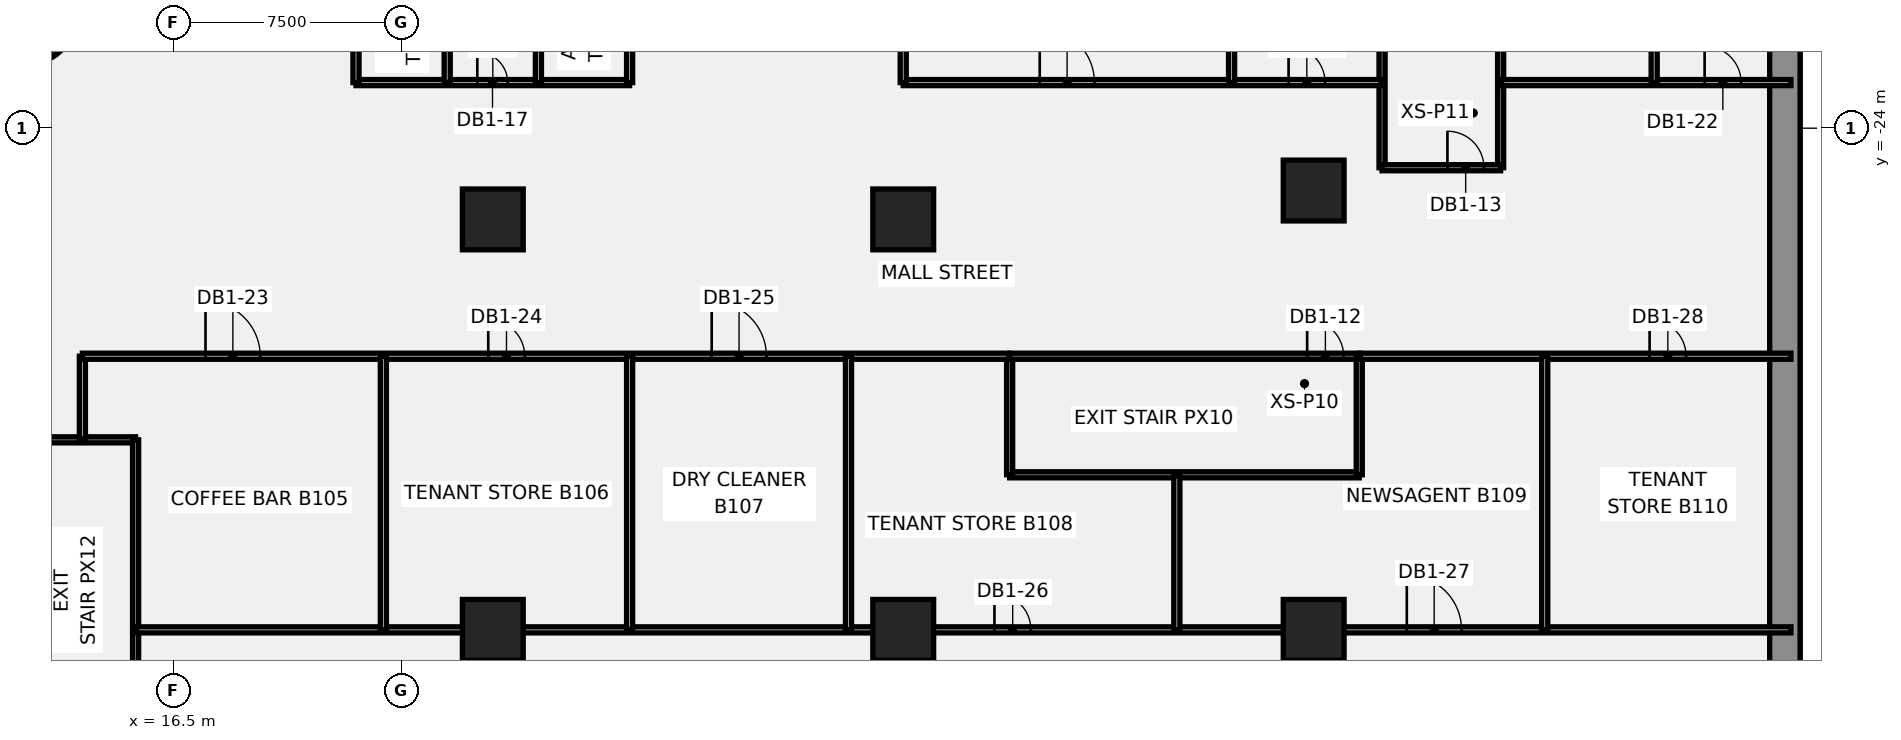
"""IFC4 building model, lengths in metres.
Left out: names, types, materials, properties, quantities, classifications, styles, units other than length and angle.
Written with IfcOpenShell. Run it as: python <this file> out.ifc"""

import sys

from ifc_helpers import new_model, si_unit, direction, frame, frame_2d, origin, origin_2d, place, context, subcontext, project, spatial, rectangle, circle, extrude, element, fill, save


model = new_model("IFC4")
c1 = context("Model", 3, precision=1e-05, world=origin(), true_north=direction((0.0, 1.0)))
c2 = subcontext(c1, "Body", "Model", "MODEL_VIEW")
j1 = project(units=[si_unit("LENGTHUNIT", "METRE"), si_unit("PLANEANGLEUNIT", "RADIAN")], contexts=[c1])
p1 = place(None, origin())
s1 = spatial("IfcSite", under=j1, at=p1, CompositionType="ELEMENT")
p2 = place(p1, origin())
s2 = spatial("IfcBuilding", under=s1, at=p2, CompositionType="ELEMENT")
p3 = place(p2, frame((0.0, 0.0, -7.0)))
s3 = spatial("IfcBuildingStorey", under=s2, at=p3, CompositionType="ELEMENT", Elevation=-7.0)
p4 = place(p3, frame((69.5, 53.931, -0.45), z_axis=(0.0, 0.0, 1.0), x_axis=(0.0, -1.0, 0.0)))
e1 = element("IfcWall", 1, at=p4, inside=s3, PredefinedType="SOLIDWALL", context=c2, shape_type="SweptSolid", body=[
    extrude(rectangle(XDim=107.863, YDim=1.0, at=frame_2d((53.931, 0.0))), origin(), (0.0, 0.0, 1.0), 6.9),
])
p5 = place(p3, frame((11.86, -20.543, -0.45), z_axis=(0.0, 0.0, 1.0), x_axis=(1.0, 0.0, 0.0)))
e2 = element("IfcColumn", 2, at=p5, inside=s3, PredefinedType="COLUMN", context=c2, shape_type="SweptSolid", body=[
    extrude(circle(Radius=1.3, at=origin_2d()), origin(), (0.0, 0.0, 1.0), 6.9),
])
for number, where, z_axis, x_axis in (
    (3, (27.0, -40.5, -0.45), (0.0, 0.0, 1.0), (1.0, 0.0, 0.0)),
    (4, (27.0, -27.0, -0.45), (0.0, 0.0, 1.0), (1.0, 0.0, 0.0)),
    (5, (40.5, -40.5, -0.45), (0.0, 0.0, 1.0), (1.0, 0.0, 0.0)),
    (6, (40.5, -27.0, -0.45), (0.0, 0.0, 1.0), (1.0, 0.0, 0.0)),
    (7, (54.0, -40.5, -0.45), (0.0, 0.0, 1.0), (1.0, 0.0, 0.0)),
    (8, (54.0, -26.05, -0.45), (0.0, 0.0, 1.0), (1.0, 0.0, 0.0)),
):
    element("IfcColumn", number, at=place(p3, frame(where, z_axis=z_axis, x_axis=x_axis)), inside=s3, PredefinedType="COLUMN", context=c2, shape_type="SweptSolid", body=[
        extrude(rectangle(XDim=2.0, YDim=2.0, at=origin_2d()), origin(), (0.0, 0.0, 1.0), 6.9),
    ])
p6 = place(p3, frame((11.35, -34.25, 0.0), z_axis=(0.0, 0.0, 1.0), x_axis=(1.0, 0.0, 0.0)))
e9 = element("IfcWall", 9, at=p6, inside=s3, PredefinedType="PARTITIONING", context=c2, shape_type="SweptSolid", body=[
    extrude(rectangle(XDim=3.9, YDim=0.2, at=frame_2d((1.95, 0.0))), origin(), (0.0, 0.0, 1.0), 6.45),
])
p7 = place(p3, frame((15.25, -45.75, 0.0), z_axis=(0.0, 0.0, 1.0), x_axis=(0.0, 1.0, 0.0)))
e10 = element("IfcWall", 10, at=p7, inside=s3, PredefinedType="PARTITIONING", context=c2, shape_type="SweptSolid", body=[
    extrude(rectangle(XDim=11.5, YDim=0.2, at=frame_2d((5.75, 0.0))), origin(), (0.0, 0.0, 1.0), 6.45),
])
p8 = place(p7, frame((0.326, 0.0, 0.0)))
e11 = element("IfcOpeningElement", 11, at=p8, cuts=e10, PredefinedType="OPENING", context=c2, shape_type="SweptSolid", body=[
    extrude(rectangle(XDim=1.2, YDim=2.1, at=frame_2d((0.6, 1.05))), frame((0.0, 0.11, 0.0), z_axis=(0.0, -1.0, 0.0), x_axis=(1.0, 0.0, 0.0)), (0.0, 0.0, 1.0), 0.22),
])
p9 = place(p3, frame((44.0, -35.4, 0.0), z_axis=(0.0, 0.0, 1.0), x_axis=(1.0, 0.0, 0.0)))
e12 = element("IfcWall", 12, at=p9, inside=s3, PredefinedType="PARTITIONING", context=c2, shape_type="SweptSolid", body=[
    extrude(rectangle(XDim=11.5, YDim=0.2, at=frame_2d((5.75, 0.0))), origin(), (0.0, 0.0, 1.0), 6.45),
])
p10 = place(p3, frame((44.0, -35.4, 0.0), z_axis=(0.0, 0.0, 1.0), x_axis=(0.0, 1.0, 0.0)))
e13 = element("IfcWall", 13, at=p10, inside=s3, PredefinedType="PARTITIONING", context=c2, shape_type="SweptSolid", body=[
    extrude(rectangle(XDim=3.9, YDim=0.2, at=frame_2d((1.95, 0.0))), origin(), (0.0, 0.0, 1.0), 6.45),
])
p11 = place(p3, frame((44.0, -31.5, 0.0), z_axis=(0.0, 0.0, 1.0), x_axis=(1.0, 0.0, 0.0)))
e14 = element("IfcWall", 14, at=p11, inside=s3, PredefinedType="PARTITIONING", context=c2, shape_type="SweptSolid", body=[
    extrude(rectangle(XDim=11.5, YDim=0.2, at=frame_2d((5.75, 0.0))), origin(), (0.0, 0.0, 1.0), 6.45),
])
p12 = place(p11, frame((9.786, 0.0, 0.0)))
e15 = element("IfcOpeningElement", 15, at=p12, cuts=e14, PredefinedType="OPENING", context=c2, shape_type="SweptSolid", body=[
    extrude(rectangle(XDim=1.2, YDim=2.1, at=frame_2d((0.6, 1.05))), frame((0.0, 0.11, 0.0), z_axis=(0.0, -1.0, 0.0), x_axis=(1.0, 0.0, 0.0)), (0.0, 0.0, 1.0), 0.22),
])
p13 = place(p3, frame((55.5, -35.4, 0.0), z_axis=(0.0, 0.0, 1.0), x_axis=(0.0, 1.0, 0.0)))
e16 = element("IfcWall", 16, at=p13, inside=s3, PredefinedType="PARTITIONING", context=c2, shape_type="SweptSolid", body=[
    extrude(rectangle(XDim=3.9, YDim=0.2, at=frame_2d((1.95, 0.0))), origin(), (0.0, 0.0, 1.0), 6.45),
])
for number, where, z_axis, x_axis in (
    (17, (56.25, -25.3, 0.0), (0.0, 0.0, 1.0), (0.0, 1.0, 0.0)),
    (18, (60.15, -25.3, 0.0), (0.0, 0.0, 1.0), (0.0, 1.0, 0.0)),
):
    element("IfcWall", number, at=place(p3, frame(where, z_axis=z_axis, x_axis=x_axis)), inside=s3, PredefinedType="PARTITIONING", context=c2, shape_type="SweptSolid", body=[
        extrude(rectangle(XDim=11.5, YDim=0.2, at=frame_2d((5.75, 0.0))), origin(), (0.0, 0.0, 1.0), 6.45),
    ])
p14 = place(p3, frame((56.25, -25.3, 0.0), z_axis=(0.0, 0.0, 1.0), x_axis=(1.0, 0.0, 0.0)))
e19 = element("IfcWall", 19, at=p14, inside=s3, PredefinedType="PARTITIONING", context=c2, shape_type="SweptSolid", body=[
    extrude(rectangle(XDim=3.9, YDim=0.2, at=frame_2d((1.95, 0.0))), origin(), (0.0, 0.0, 1.0), 6.45),
])
p15 = place(p14, frame((2.15, 0.0, 0.0)))
e20 = element("IfcOpeningElement", 20, at=p15, cuts=e19, PredefinedType="OPENING", context=c2, shape_type="SweptSolid", body=[
    extrude(rectangle(XDim=1.2, YDim=2.1, at=frame_2d((0.6, 1.05))), frame((0.0, 0.11, 0.0), z_axis=(0.0, -1.0, 0.0), x_axis=(1.0, 0.0, 0.0)), (0.0, 0.0, 1.0), 0.22),
])
p16 = place(p3, frame((13.5, -34.22, 0.0), z_axis=(0.0, 0.0, 1.0), x_axis=(0.0, 1.0, 0.0)))
e21 = element("IfcWall", 21, at=p16, inside=s3, PredefinedType="PARTITIONING", context=c2, shape_type="SweptSolid", body=[
    extrude(rectangle(XDim=2.72, YDim=0.2, at=frame_2d((1.36, 0.0))), origin(), (0.0, 0.0, 1.0), 6.45),
])
p17 = place(p3, frame((13.5, -31.5, 0.0), z_axis=(0.0, 0.0, 1.0), x_axis=(1.0, 0.0, 0.0)))
e22 = element("IfcWall", 22, at=p17, inside=s3, PredefinedType="PARTITIONING", context=c2, shape_type="SweptSolid", body=[
    extrude(rectangle(XDim=30.47, YDim=0.2, at=frame_2d((15.235, 0.0))), origin(), (0.0, 0.0, 1.0), 6.45),
])
p18 = place(p17, frame((4.05, 0.0, 0.0)))
e23 = element("IfcOpeningElement", 23, at=p18, cuts=e22, PredefinedType="OPENING", context=c2, shape_type="SweptSolid", body=[
    extrude(rectangle(XDim=1.8, YDim=2.1, at=frame_2d((0.9, 1.05))), frame((0.0, 0.11, 0.0), z_axis=(0.0, -1.0, 0.0), x_axis=(1.0, 0.0, 0.0)), (0.0, 0.0, 1.0), 0.22),
])
p19 = place(p17, frame((13.35, 0.0, 0.0)))
e24 = element("IfcOpeningElement", 24, at=p19, cuts=e22, PredefinedType="OPENING", context=c2, shape_type="SweptSolid", body=[
    extrude(rectangle(XDim=1.2, YDim=2.1, at=frame_2d((0.6, 1.05))), frame((0.0, 0.11, 0.0), z_axis=(0.0, -1.0, 0.0), x_axis=(1.0, 0.0, 0.0)), (0.0, 0.0, 1.0), 0.22),
])
p20 = place(p17, frame((20.7, 0.0, 0.0)))
e25 = element("IfcOpeningElement", 25, at=p20, cuts=e22, PredefinedType="OPENING", context=c2, shape_type="SweptSolid", body=[
    extrude(rectangle(XDim=1.8, YDim=2.1, at=frame_2d((0.9, 1.05))), frame((0.0, 0.11, 0.0), z_axis=(0.0, -1.0, 0.0), x_axis=(1.0, 0.0, 0.0)), (0.0, 0.0, 1.0), 0.22),
])
p21 = place(p3, frame((15.28, -40.5, 0.0), z_axis=(0.0, 0.0, 1.0), x_axis=(1.0, 0.0, 0.0)))
e26 = element("IfcWall", 26, at=p21, inside=s3, PredefinedType="PARTITIONING", context=c2, shape_type="SweptSolid", body=[
    extrude(rectangle(XDim=54.419, YDim=0.2, at=frame_2d((27.209, 0.0))), origin(), (0.0, 0.0, 1.0), 6.45),
])
p22 = place(p21, frame((28.22, 0.0, 0.0)))
e27 = element("IfcOpeningElement", 27, at=p22, cuts=e26, PredefinedType="OPENING", context=c2, shape_type="SweptSolid", body=[
    extrude(rectangle(XDim=1.2, YDim=2.1, at=frame_2d((0.6, 1.05))), frame((0.0, 0.11, 0.0), z_axis=(0.0, -1.0, 0.0), x_axis=(1.0, 0.0, 0.0)), (0.0, 0.0, 1.0), 0.22),
])
p23 = place(p21, frame((41.784, 0.0, 0.0)))
e28 = element("IfcOpeningElement", 28, at=p23, cuts=e26, PredefinedType="OPENING", context=c2, shape_type="SweptSolid", body=[
    extrude(rectangle(XDim=1.8, YDim=2.1, at=frame_2d((0.9, 1.05))), frame((0.0, 0.11, 0.0), z_axis=(0.0, -1.0, 0.0), x_axis=(1.0, 0.0, 0.0)), (0.0, 0.0, 1.0), 0.22),
])
p24 = place(p3, frame((23.4, -40.5, 0.0), z_axis=(0.0, 0.0, 1.0), x_axis=(0.0, 1.0, 0.0)))
e29 = element("IfcWall", 29, at=p24, inside=s3, PredefinedType="PARTITIONING", context=c2, shape_type="SweptSolid", body=[
    extrude(rectangle(XDim=9.0, YDim=0.2, at=frame_2d((4.5, 0.0))), origin(), (0.0, 0.0, 1.0), 6.45),
])
p25 = place(p3, frame((22.5, -22.5, 0.0), z_axis=(0.0, 0.0, 1.0), x_axis=(1.0, 0.0, 0.0)))
e30 = element("IfcWall", 30, at=p25, inside=s3, PredefinedType="PARTITIONING", context=c2, shape_type="SweptSolid", body=[
    extrude(rectangle(XDim=9.0, YDim=0.2, at=frame_2d((4.5, 0.0))), origin(), (0.0, 0.0, 1.0), 6.45),
])
p26 = place(p25, frame((3.99, 0.0, 0.0)))
e31 = element("IfcOpeningElement", 31, at=p26, cuts=e30, PredefinedType="OPENING", context=c2, shape_type="SweptSolid", body=[
    extrude(rectangle(XDim=1.0, YDim=2.1, at=frame_2d((0.5, 1.05))), frame((0.0, 0.11, 0.0), z_axis=(0.0, -1.0, 0.0), x_axis=(1.0, 0.0, 0.0)), (0.0, 0.0, 1.0), 0.22),
])
p27 = place(p3, frame((25.5, -22.5, 0.0), z_axis=(0.0, 0.0, 1.0), x_axis=(0.0, 1.0, 0.0)))
e32 = element("IfcWall", 32, at=p27, inside=s3, PredefinedType="PARTITIONING", context=c2, shape_type="SweptSolid", body=[
    extrude(rectangle(XDim=9.0, YDim=0.2, at=frame_2d((4.5, 0.0))), origin(), (0.0, 0.0, 1.0), 6.45),
])
p28 = place(p3, frame((22.5, -22.5, 0.0), z_axis=(0.0, 0.0, 1.0), x_axis=(0.0, 1.0, 0.0)))
e33 = element("IfcWall", 33, at=p28, inside=s3, PredefinedType="PARTITIONING", context=c2, shape_type="SweptSolid", body=[
    extrude(rectangle(XDim=9.0, YDim=0.2, at=frame_2d((4.5, 0.0))), origin(), (0.0, 0.0, 1.0), 6.45),
])
p29 = place(p28, frame((5.5, 0.0, 0.0)))
e34 = element("IfcOpeningElement", 34, at=p29, cuts=e33, PredefinedType="OPENING", context=c2, shape_type="SweptSolid", body=[
    extrude(rectangle(XDim=1.0, YDim=2.1, at=frame_2d((0.5, 1.05))), frame((0.0, 0.11, 0.0), z_axis=(0.0, -1.0, 0.0), x_axis=(1.0, 0.0, 0.0)), (0.0, 0.0, 1.0), 0.22),
])
p30 = place(p3, frame((31.5, -22.5, 0.0), z_axis=(0.0, 0.0, 1.0), x_axis=(0.0, 1.0, 0.0)))
e35 = element("IfcWall", 35, at=p30, inside=s3, PredefinedType="PARTITIONING", context=c2, shape_type="SweptSolid", body=[
    extrude(rectangle(XDim=9.0, YDim=0.2, at=frame_2d((4.5, 0.0))), origin(), (0.0, 0.0, 1.0), 6.45),
])
p31 = place(p30, frame((5.46, 0.0, 0.0)))
e36 = element("IfcOpeningElement", 36, at=p31, cuts=e35, PredefinedType="OPENING", context=c2, shape_type="SweptSolid", body=[
    extrude(rectangle(XDim=1.1, YDim=2.1, at=frame_2d((0.55, 1.05))), frame((0.0, 0.11, 0.0), z_axis=(0.0, -1.0, 0.0), x_axis=(1.0, 0.0, 0.0)), (0.0, 0.0, 1.0), 0.22),
])
for number, where, z_axis, x_axis in (
    (37, (28.5, -22.5, 0.0), (0.0, 0.0, 1.0), (0.0, 1.0, 0.0)),
    (38, (31.5, -40.5, 0.0), (0.0, 0.0, 1.0), (0.0, 1.0, 0.0)),
    (39, (38.7, -40.5, 0.0), (0.0, 0.0, 1.0), (0.0, 1.0, 0.0)),
):
    element("IfcWall", number, at=place(p3, frame(where, z_axis=z_axis, x_axis=x_axis)), inside=s3, PredefinedType="PARTITIONING", context=c2, shape_type="SweptSolid", body=[
        extrude(rectangle(XDim=9.0, YDim=0.2, at=frame_2d((4.5, 0.0))), origin(), (0.0, 0.0, 1.0), 6.45),
    ])
p32 = place(p3, frame((49.5, -40.5, 0.0), z_axis=(0.0, 0.0, 1.0), x_axis=(0.0, 1.0, 0.0)))
e40 = element("IfcWall", 40, at=p32, inside=s3, PredefinedType="PARTITIONING", context=c2, shape_type="SweptSolid", body=[
    extrude(rectangle(XDim=5.07, YDim=0.2, at=frame_2d((2.535, 0.0))), origin(), (0.0, 0.0, 1.0), 6.45),
])
p33 = place(p3, frame((40.5, -22.5, 0.0), z_axis=(0.0, 0.0, 1.0), x_axis=(1.0, 0.0, 0.0)))
e41 = element("IfcWall", 41, at=p33, inside=s3, PredefinedType="PARTITIONING", context=c2, shape_type="SweptSolid", body=[
    extrude(rectangle(XDim=15.72, YDim=0.2, at=frame_2d((7.86, 0.0))), origin(), (0.0, 0.0, 1.0), 6.45),
])
p34 = place(p33, frame((4.49, 0.0, 0.0)))
e42 = element("IfcOpeningElement", 42, at=p34, cuts=e41, PredefinedType="OPENING", context=c2, shape_type="SweptSolid", body=[
    extrude(rectangle(XDim=1.8, YDim=2.1, at=frame_2d((0.9, 1.05))), frame((0.0, 0.11, 0.0), z_axis=(0.0, -1.0, 0.0), x_axis=(1.0, 0.0, 0.0)), (0.0, 0.0, 1.0), 0.22),
])
p35 = place(p33, frame((12.675, 0.0, 0.0)))
e43 = element("IfcOpeningElement", 43, at=p35, cuts=e41, PredefinedType="OPENING", context=c2, shape_type="SweptSolid", body=[
    extrude(rectangle(XDim=1.2, YDim=2.1, at=frame_2d((0.6, 1.05))), frame((0.0, 0.11, 0.0), z_axis=(0.0, -1.0, 0.0), x_axis=(1.0, 0.0, 0.0)), (0.0, 0.0, 1.0), 0.22),
])
for number, where, z_axis, x_axis in (
    (44, (51.3, -22.5, 0.0), (0.0, 0.0, 1.0), (0.0, 1.0, 0.0)),
    (45, (40.5, -22.5, 0.0), (0.0, 0.0, 1.0), (0.0, 1.0, 0.0)),
):
    element("IfcWall", number, at=place(p3, frame(where, z_axis=z_axis, x_axis=x_axis)), inside=s3, PredefinedType="PARTITIONING", context=c2, shape_type="SweptSolid", body=[
        extrude(rectangle(XDim=9.0, YDim=0.2, at=frame_2d((4.5, 0.0))), origin(), (0.0, 0.0, 1.0), 6.45),
    ])
p36 = place(p3, frame((55.53, -31.5, 0.0), z_axis=(0.0, 0.0, 1.0), x_axis=(1.0, 0.0, 0.0)))
e46 = element("IfcWall", 46, at=p36, inside=s3, PredefinedType="PARTITIONING", context=c2, shape_type="SweptSolid", body=[
    extrude(rectangle(XDim=14.169, YDim=0.2, at=frame_2d((7.084, 0.0))), origin(), (0.0, 0.0, 1.0), 6.45),
])
p37 = place(p36, frame((9.52, 0.0, 0.0)))
e47 = element("IfcOpeningElement", 47, at=p37, cuts=e46, PredefinedType="OPENING", context=c2, shape_type="SweptSolid", body=[
    extrude(rectangle(XDim=1.2, YDim=2.1, at=frame_2d((0.6, 1.05))), frame((0.0, 0.11, 0.0), z_axis=(0.0, -1.0, 0.0), x_axis=(1.0, 0.0, 0.0)), (0.0, 0.0, 1.0), 0.22),
])
p38 = place(p3, frame((60.18, -22.5, 0.0), z_axis=(0.0, 0.0, 1.0), x_axis=(1.0, 0.0, 0.0)))
e48 = element("IfcWall", 48, at=p38, inside=s3, PredefinedType="PARTITIONING", context=c2, shape_type="SweptSolid", body=[
    extrude(rectangle(XDim=9.519, YDim=0.2, at=frame_2d((4.76, 0.0))), origin(), (0.0, 0.0, 1.0), 6.45),
])
p39 = place(p38, frame((6.68, 0.0, 0.0)))
e49 = element("IfcOpeningElement", 49, at=p39, cuts=e48, PredefinedType="OPENING", context=c2, shape_type="SweptSolid", body=[
    extrude(rectangle(XDim=1.2, YDim=2.1, at=frame_2d((0.6, 1.05))), frame((0.0, 0.11, 0.0), z_axis=(0.0, -1.0, 0.0), x_axis=(1.0, 0.0, 0.0)), (0.0, 0.0, 1.0), 0.22),
])
for number, where, z_axis, x_axis in (
    (50, (61.6, -40.5, 0.0), (0.0, 0.0, 1.0), (0.0, 1.0, 0.0)),
    (51, (65.2, -22.5, 0.0), (0.0, 0.0, 1.0), (0.0, 1.0, 0.0)),
):
    element("IfcWall", number, at=place(p3, frame(where, z_axis=z_axis, x_axis=x_axis)), inside=s3, PredefinedType="PARTITIONING", context=c2, shape_type="SweptSolid", body=[
        extrude(rectangle(XDim=9.0, YDim=0.2, at=frame_2d((4.5, 0.0))), origin(), (0.0, 0.0, 1.0), 6.45),
    ])
p40 = place(p12, origin())
e52 = element("IfcDoor", 52, at=p40, inside=s3, OperationType="SINGLE_SWING_RIGHT", PredefinedType="DOOR", context=c2, shape_type="SweptSolid", body=[
    extrude(rectangle(XDim=1.2, YDim=2.1, at=frame_2d((0.6, 1.05))), frame((0.0, 0.025, 0.0), z_axis=(0.0, -1.0, 0.0), x_axis=(1.0, 0.0, 0.0)), (0.0, 0.0, 1.0), 0.05),
])
fill(e15, e52)
p41 = place(p15, origin())
e53 = element("IfcDoor", 53, at=p41, inside=s3, OperationType="SINGLE_SWING_LEFT", PredefinedType="DOOR", context=c2, shape_type="SweptSolid", body=[
    extrude(rectangle(XDim=1.2, YDim=2.1, at=frame_2d((0.6, 1.05))), frame((0.0, 0.025, 0.0), z_axis=(0.0, -1.0, 0.0), x_axis=(1.0, 0.0, 0.0)), (0.0, 0.0, 1.0), 0.05),
])
fill(e20, e53)
p42 = place(p26, origin())
e54 = element("IfcDoor", 54, at=p42, inside=s3, OperationType="SINGLE_SWING_LEFT", PredefinedType="DOOR", context=c2, shape_type="SweptSolid", body=[
    extrude(rectangle(XDim=1.0, YDim=2.1, at=frame_2d((0.5, 1.05))), frame((0.0, 0.025, 0.0), z_axis=(0.0, -1.0, 0.0), x_axis=(1.0, 0.0, 0.0)), (0.0, 0.0, 1.0), 0.05),
])
fill(e31, e54)
p43 = place(p34, origin())
e55 = element("IfcDoor", 55, at=p43, inside=s3, OperationType="SINGLE_SWING_LEFT", PredefinedType="DOOR", context=c2, shape_type="SweptSolid", body=[
    extrude(rectangle(XDim=1.8, YDim=2.1, at=frame_2d((0.9, 1.05))), frame((0.0, 0.025, 0.0), z_axis=(0.0, -1.0, 0.0), x_axis=(1.0, 0.0, 0.0)), (0.0, 0.0, 1.0), 0.05),
])
fill(e42, e55)
p44 = place(p35, origin())
e56 = element("IfcDoor", 56, at=p44, inside=s3, OperationType="SINGLE_SWING_RIGHT", PredefinedType="DOOR", context=c2, shape_type="SweptSolid", body=[
    extrude(rectangle(XDim=1.2, YDim=2.1, at=frame_2d((0.6, 1.05))), frame((0.0, 0.025, 0.0), z_axis=(0.0, -1.0, 0.0), x_axis=(1.0, 0.0, 0.0)), (0.0, 0.0, 1.0), 0.05),
])
fill(e43, e56)
p45 = place(p39, origin())
e57 = element("IfcDoor", 57, at=p45, inside=s3, OperationType="SINGLE_SWING_RIGHT", PredefinedType="DOOR", context=c2, shape_type="SweptSolid", body=[
    extrude(rectangle(XDim=1.2, YDim=2.1, at=frame_2d((0.6, 1.05))), frame((0.0, 0.025, 0.0), z_axis=(0.0, -1.0, 0.0), x_axis=(1.0, 0.0, 0.0)), (0.0, 0.0, 1.0), 0.05),
])
fill(e49, e57)
p46 = place(p18, origin())
e58 = element("IfcDoor", 58, at=p46, inside=s3, OperationType="SINGLE_SWING_LEFT", PredefinedType="DOOR", context=c2, shape_type="SweptSolid", body=[
    extrude(rectangle(XDim=1.8, YDim=2.1, at=frame_2d((0.9, 1.05))), frame((0.0, 0.025, 0.0), z_axis=(0.0, -1.0, 0.0), x_axis=(1.0, 0.0, 0.0)), (0.0, 0.0, 1.0), 0.05),
])
fill(e23, e58)
p47 = place(p19, origin())
e59 = element("IfcDoor", 59, at=p47, inside=s3, OperationType="SINGLE_SWING_RIGHT", PredefinedType="DOOR", context=c2, shape_type="SweptSolid", body=[
    extrude(rectangle(XDim=1.2, YDim=2.1, at=frame_2d((0.6, 1.05))), frame((0.0, 0.025, 0.0), z_axis=(0.0, -1.0, 0.0), x_axis=(1.0, 0.0, 0.0)), (0.0, 0.0, 1.0), 0.05),
])
fill(e24, e59)
p48 = place(p20, origin())
e60 = element("IfcDoor", 60, at=p48, inside=s3, OperationType="SINGLE_SWING_LEFT", PredefinedType="DOOR", context=c2, shape_type="SweptSolid", body=[
    extrude(rectangle(XDim=1.8, YDim=2.1, at=frame_2d((0.9, 1.05))), frame((0.0, 0.025, 0.0), z_axis=(0.0, -1.0, 0.0), x_axis=(1.0, 0.0, 0.0)), (0.0, 0.0, 1.0), 0.05),
])
fill(e25, e60)
p49 = place(p22, origin())
e61 = element("IfcDoor", 61, at=p49, inside=s3, OperationType="SINGLE_SWING_RIGHT", PredefinedType="DOOR", context=c2, shape_type="SweptSolid", body=[
    extrude(rectangle(XDim=1.2, YDim=2.1, at=frame_2d((0.6, 1.05))), frame((0.0, 0.025, 0.0), z_axis=(0.0, -1.0, 0.0), x_axis=(1.0, 0.0, 0.0)), (0.0, 0.0, 1.0), 0.05),
])
fill(e27, e61)
p50 = place(p23, origin())
e62 = element("IfcDoor", 62, at=p50, inside=s3, OperationType="SINGLE_SWING_LEFT", PredefinedType="DOOR", context=c2, shape_type="SweptSolid", body=[
    extrude(rectangle(XDim=1.8, YDim=2.1, at=frame_2d((0.9, 1.05))), frame((0.0, 0.025, 0.0), z_axis=(0.0, -1.0, 0.0), x_axis=(1.0, 0.0, 0.0)), (0.0, 0.0, 1.0), 0.05),
])
fill(e28, e62)
p51 = place(p37, origin())
e63 = element("IfcDoor", 63, at=p51, inside=s3, OperationType="SINGLE_SWING_RIGHT", PredefinedType="DOOR", context=c2, shape_type="SweptSolid", body=[
    extrude(rectangle(XDim=1.2, YDim=2.1, at=frame_2d((0.6, 1.05))), frame((0.0, 0.025, 0.0), z_axis=(0.0, -1.0, 0.0), x_axis=(1.0, 0.0, 0.0)), (0.0, 0.0, 1.0), 0.05),
])
fill(e47, e63)
save(model, sys.argv[1])
